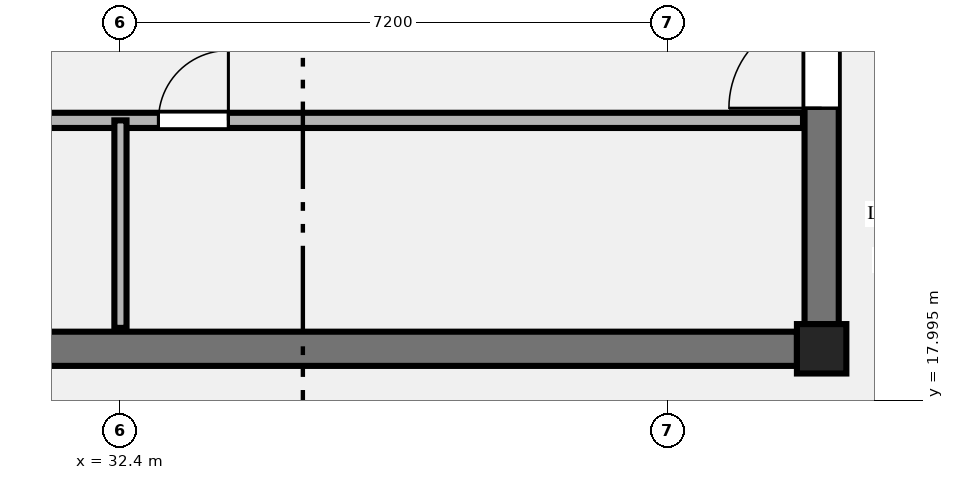
"""IFC4 building model, lengths in metres.
Left out: names, types, materials, properties, quantities, classifications, styles, units other than length and angle.
Written with IfcOpenShell. Run it as: python <this file> out.ifc"""

import sys

from ifc_helpers import new_model, si_unit, direction, frame, frame_2d, origin, origin_2d, place, context, subcontext, project, spatial, rectangle, extrude, element, fill, save


model = new_model("IFC4")
c1 = context("Model", 3, precision=1e-05, world=origin(), true_north=direction((0.0, 1.0)))
c2 = subcontext(c1, "Body", "Model", "MODEL_VIEW")
j1 = project(units=[si_unit("LENGTHUNIT", "METRE"), si_unit("PLANEANGLEUNIT", "RADIAN")], contexts=[c1])
p1 = place(None, origin())
s1 = spatial("IfcSite", under=j1, at=p1, CompositionType="ELEMENT")
p2 = place(p1, origin())
s2 = spatial("IfcBuilding", under=s1, at=p2, CompositionType="ELEMENT")
p3 = place(p2, frame((0.0, 0.0, 227.0)))
s3 = spatial("IfcBuildingStorey", under=s2, at=p3, CompositionType="ELEMENT", Elevation=227.0)
p4 = place(p3, frame((41.625, 18.675, 0.0), z_axis=(0.0, 0.0, 1.0), x_axis=(1.0, 0.0, 0.0)))
e1 = element("IfcColumn", 1, at=p4, inside=s3, PredefinedType="COLUMN", context=c2, shape_type="SweptSolid", body=[
    extrude(rectangle(XDim=0.65, YDim=0.65, at=origin_2d()), origin(), (0.0, 0.0, 1.0), 3.65),
])
p5 = place(p3, frame((23.5, 18.675, 0.0), z_axis=(0.0, 0.0, 1.0), x_axis=(1.0, 0.0, 0.0)))
e2 = element("IfcWall", 2, at=p5, inside=s3, PredefinedType="SHEAR", context=c2, shape_type="SweptSolid", body=[
    extrude(rectangle(XDim=17.8, YDim=0.45, at=frame_2d((8.9, 0.0))), origin(), (0.0, 0.0, 1.0), 3.45),
])
p6 = place(p3, frame((41.625, 19.0, 0.0), z_axis=(0.0, 0.0, 1.0), x_axis=(0.0, 1.0, 0.0)))
e3 = element("IfcWall", 3, at=p6, inside=s3, PredefinedType="SHEAR", context=c2, shape_type="SweptSolid", body=[
    extrude(rectangle(XDim=13.8, YDim=0.45, at=frame_2d((6.9, 0.0))), origin(), (0.0, 0.0, 1.0), 3.45),
])
p7 = place(p6, frame((2.84, 0.0, 0.0)))
e4 = element("IfcOpeningElement", 4, at=p7, cuts=e3, PredefinedType="OPENING", context=c2, shape_type="SweptSolid", body=[
    extrude(rectangle(XDim=1.22, YDim=2.25, at=frame_2d((0.61, 1.125))), frame((0.0, 0.235, 0.0), z_axis=(0.0, -1.0, 0.0), x_axis=(1.0, 0.0, 0.0)), (0.0, 0.0, 1.0), 0.47),
])
p8 = place(p3, frame((23.42, 21.68, 0.0), z_axis=(0.0, 0.0, 1.0), x_axis=(1.0, 0.0, 0.0)))
e5 = element("IfcWall", 5, at=p8, inside=s3, PredefinedType="PLUMBINGWALL", context=c2, shape_type="SweptSolid", body=[
    extrude(rectangle(XDim=17.96, YDim=0.2, at=frame_2d((8.98, 0.0))), origin(), (0.0, 0.0, 1.0), 3.45),
])
p9 = place(p8, frame((0.46, 0.0, 0.0)))
e6 = element("IfcOpeningElement", 6, at=p9, cuts=e5, PredefinedType="OPENING", context=c2, shape_type="SweptSolid", body=[
    extrude(rectangle(XDim=0.92, YDim=2.15, at=frame_2d((0.46, 1.075))), frame((0.0, 0.11, 0.0), z_axis=(0.0, -1.0, 0.0), x_axis=(1.0, 0.0, 0.0)), (0.0, 0.0, 1.0), 0.22),
])
p10 = place(p8, frame((9.48, 0.0, 0.0)))
e7 = element("IfcOpeningElement", 7, at=p10, cuts=e5, PredefinedType="OPENING", context=c2, shape_type="SweptSolid", body=[
    extrude(rectangle(XDim=0.92, YDim=2.15, at=frame_2d((0.46, 1.075))), frame((0.0, 0.11, 0.0), z_axis=(0.0, -1.0, 0.0), x_axis=(1.0, 0.0, 0.0)), (0.0, 0.0, 1.0), 0.22),
])
p11 = place(p3, frame((32.4, 18.95, 0.0), z_axis=(0.0, 0.0, 1.0), x_axis=(0.0, 1.0, 0.0)))
e8 = element("IfcWall", 8, at=p11, inside=s3, PredefinedType="PARTITIONING", context=c2, shape_type="SweptSolid", body=[
    extrude(rectangle(XDim=2.73, YDim=0.16, at=frame_2d((1.365, 0.0))), origin(), (0.0, 0.0, 1.0), 3.45),
])
p12 = place(p7, origin())
e9 = element("IfcDoor", 9, at=p12, inside=s3, OperationType="SINGLE_SWING_LEFT", PredefinedType="DOOR", context=c2, shape_type="SweptSolid", body=[
    extrude(rectangle(XDim=1.22, YDim=2.25, at=frame_2d((0.61, 1.125))), frame((0.0, 0.025, 0.0), z_axis=(0.0, -1.0, 0.0), x_axis=(1.0, 0.0, 0.0)), (0.0, 0.0, 1.0), 0.05),
])
fill(e4, e9)
p13 = place(p10, origin())
e10 = element("IfcDoor", 10, at=p13, inside=s3, OperationType="SINGLE_SWING_RIGHT", PredefinedType="DOOR", context=c2, shape_type="SweptSolid", body=[
    extrude(rectangle(XDim=0.92, YDim=2.15, at=frame_2d((0.46, 1.075))), frame((0.0, 0.025, 0.0), z_axis=(0.0, -1.0, 0.0), x_axis=(1.0, 0.0, 0.0)), (0.0, 0.0, 1.0), 0.05),
])
fill(e7, e10)
save(model, sys.argv[1])
